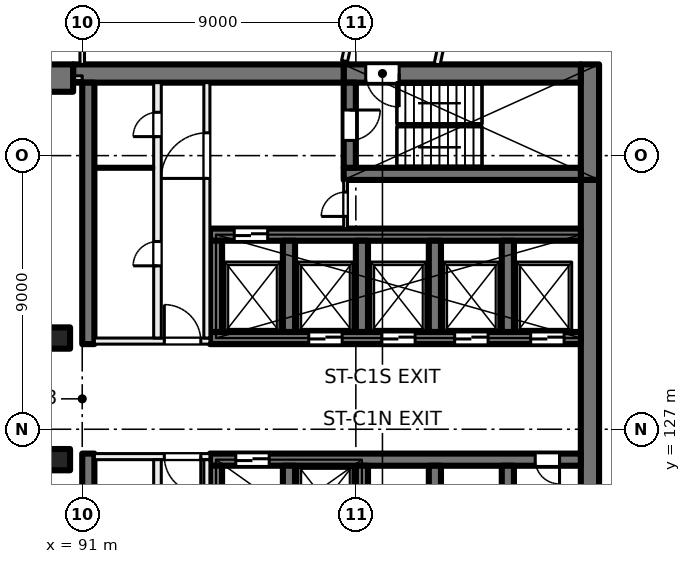
"""IFC4 building model, lengths in metres.
Left out: names, types, materials, properties, quantities, classifications, styles, units other than length and angle.
Written with IfcOpenShell. Run it as: python <this file> out.ifc"""

import sys

from ifc_helpers import new_model, si_unit, direction, frame, frame_2d, origin, origin_2d, place, context, subcontext, project, spatial, rectangle, extrude, element, fill, save


model = new_model("IFC4")
c1 = context("Model", 3, precision=1e-05, world=origin(), true_north=direction((0.0, 1.0)))
c2 = subcontext(c1, "Body", "Model", "MODEL_VIEW")
j1 = project(units=[si_unit("LENGTHUNIT", "METRE"), si_unit("PLANEANGLEUNIT", "RADIAN")], contexts=[c1])
p1 = place(None, origin())
s1 = spatial("IfcSite", under=j1, at=p1, CompositionType="ELEMENT")
p2 = place(p1, origin())
s2 = spatial("IfcBuilding", under=s1, at=p2, CompositionType="ELEMENT")
p3 = place(p2, origin())
s3 = spatial("IfcBuildingStorey", under=s2, at=p3, CompositionType="ELEMENT", Elevation=0.0)
for number, where, z_axis, x_axis in (
    (1, (90.25, 130.0, 0.0), (0.0, 0.0, 1.0), (1.0, 0.0, 0.0)),
    (2, (90.25, 126.0, 0.0), (0.0, 0.0, 1.0), (1.0, 0.0, 0.0)),
):
    element("IfcColumn", number, at=place(p3, frame(where, z_axis=z_axis, x_axis=x_axis)), inside=s3, PredefinedType="COLUMN", context=c2, shape_type="SweptSolid", body=[
        extrude(rectangle(XDim=0.7, YDim=0.7, at=origin_2d()), origin(), (0.0, 0.0, 1.0), 7.5),
    ])
p4 = place(p3, frame((90.25, 138.55, 0.0), z_axis=(0.0, 0.0, 1.0), x_axis=(1.0, 0.0, 0.0)))
e3 = element("IfcColumn", 3, at=p4, inside=s3, PredefinedType="COLUMN", context=c2, shape_type="SweptSolid", body=[
    extrude(rectangle(XDim=0.9, YDim=0.9, at=origin_2d()), origin(), (0.0, 0.0, 1.0), 7.5),
])
p5 = place(p3, frame((107.7, 139.0, 0.0), z_axis=(0.0, 0.0, 1.0), x_axis=(0.0, -1.0, 0.0)))
e4 = element("IfcWall", 4, at=p5, inside=s3, PredefinedType="SHEAR", context=c2, shape_type="SweptSolid", body=[
    extrude(rectangle(XDim=3.8, YDim=0.6, at=frame_2d((1.9, 0.0))), origin(), (0.0, 0.0, 1.0), 7.5),
])
p6 = place(p3, frame((107.7, 135.2, 0.0), z_axis=(0.0, 0.0, 1.0), x_axis=(0.0, -1.0, 0.0)))
e5 = element("IfcWall", 5, at=p6, inside=s3, PredefinedType="SHEAR", context=c2, shape_type="SweptSolid", body=[
    extrude(rectangle(XDim=14.4, YDim=0.6, at=frame_2d((7.2, 0.0))), origin(), (0.0, 0.0, 1.0), 7.5),
])
p7 = place(p3, frame((107.4, 138.7, 0.0), z_axis=(0.0, 0.0, 1.0), x_axis=(-1.0, 0.0, 0.0)))
e6 = element("IfcWall", 6, at=p7, inside=s3, PredefinedType="SHEAR", context=c2, shape_type="SweptSolid", body=[
    extrude(rectangle(XDim=7.8, YDim=0.6, at=frame_2d((3.9, 0.0))), origin(), (0.0, 0.0, 1.0), 7.5),
])
p8 = place(p7, frame((5.975, 0.0, 0.0)))
e7 = element("IfcOpeningElement", 7, at=p8, cuts=e6, PredefinedType="OPENING", context=c2, shape_type="SweptSolid", body=[
    extrude(rectangle(XDim=1.1, YDim=2.1, at=frame_2d((0.55, 1.05))), frame((0.0, 0.31, 0.0), z_axis=(0.0, -1.0, 0.0), x_axis=(1.0, 0.0, 0.0)), (0.0, 0.0, 1.0), 0.62),
])
p9 = place(p3, frame((99.6, 138.7, 0.0), z_axis=(0.0, 0.0, 1.0), x_axis=(-1.0, 0.0, 0.0)))
e8 = element("IfcWall", 8, at=p9, inside=s3, PredefinedType="SHEAR", context=c2, shape_type="SweptSolid", body=[
    extrude(rectangle(XDim=8.9, YDim=0.6, at=frame_2d((4.45, 0.0))), origin(), (0.0, 0.0, 1.0), 7.5),
])
p10 = place(p3, frame((107.4, 135.4, 0.0), z_axis=(0.0, 0.0, 1.0), x_axis=(-1.0, 0.0, 0.0)))
e9 = element("IfcWall", 9, at=p10, inside=s3, PredefinedType="SHEAR", context=c2, shape_type="SweptSolid", body=[
    extrude(rectangle(XDim=7.8, YDim=0.4, at=frame_2d((3.9, 0.0))), origin(), (0.0, 0.0, 1.0), 7.5),
])
p11 = place(p3, frame((99.8, 138.4, 0.0), z_axis=(0.0, 0.0, 1.0), x_axis=(0.0, -1.0, 0.0)))
e10 = element("IfcWall", 10, at=p11, inside=s3, PredefinedType="SHEAR", context=c2, shape_type="SweptSolid", body=[
    extrude(rectangle(XDim=2.8, YDim=0.4, at=frame_2d((1.4, 0.0))), origin(), (0.0, 0.0, 1.0), 7.5),
])
p12 = place(p11, frame((0.9, 0.0, 0.0)))
e11 = element("IfcOpeningElement", 11, at=p12, cuts=e10, PredefinedType="OPENING", context=c2, shape_type="SweptSolid", body=[
    extrude(rectangle(XDim=1.0, YDim=2.1, at=frame_2d((0.5, 1.05))), frame((0.0, 0.21, 0.0), z_axis=(0.0, -1.0, 0.0), x_axis=(1.0, 0.0, 0.0)), (0.0, 0.0, 1.0), 0.42),
])
p13 = place(p3, frame((107.4, 130.0, 0.0), z_axis=(0.0, 0.0, 1.0), x_axis=(-1.0, 0.0, 0.0)))
e12 = element("IfcWall", 12, at=p13, inside=s3, PredefinedType="SHEAR", context=c2, shape_type="SweptSolid", body=[
    extrude(rectangle(XDim=12.2, YDim=0.4, at=frame_2d((6.1, 0.0))), origin(), (0.0, 0.0, 1.0), 7.5),
])
p14 = place(p13, frame((0.55, 0.0, 0.0)))
e13 = element("IfcOpeningElement", 13, at=p14, cuts=e12, PredefinedType="OPENING", context=c2, shape_type="SweptSolid", body=[
    extrude(rectangle(XDim=1.1, YDim=2.1, at=frame_2d((0.55, 1.05))), frame((0.0, 0.21, 0.0), z_axis=(0.0, -1.0, 0.0), x_axis=(1.0, 0.0, 0.0)), (0.0, 0.0, 1.0), 0.42),
])
p15 = place(p13, frame((3.05, 0.0, 0.0)))
e14 = element("IfcOpeningElement", 14, at=p15, cuts=e12, PredefinedType="OPENING", context=c2, shape_type="SweptSolid", body=[
    extrude(rectangle(XDim=1.1, YDim=2.1, at=frame_2d((0.55, 1.05))), frame((0.0, 0.21, 0.0), z_axis=(0.0, -1.0, 0.0), x_axis=(1.0, 0.0, 0.0)), (0.0, 0.0, 1.0), 0.42),
])
p16 = place(p13, frame((5.45, 0.0, 0.0)))
e15 = element("IfcOpeningElement", 15, at=p16, cuts=e12, PredefinedType="OPENING", context=c2, shape_type="SweptSolid", body=[
    extrude(rectangle(XDim=1.1, YDim=2.1, at=frame_2d((0.55, 1.05))), frame((0.0, 0.21, 0.0), z_axis=(0.0, -1.0, 0.0), x_axis=(1.0, 0.0, 0.0)), (0.0, 0.0, 1.0), 0.42),
])
p17 = place(p13, frame((7.85, 0.0, 0.0)))
e16 = element("IfcOpeningElement", 16, at=p17, cuts=e12, PredefinedType="OPENING", context=c2, shape_type="SweptSolid", body=[
    extrude(rectangle(XDim=1.1, YDim=2.1, at=frame_2d((0.55, 1.05))), frame((0.0, 0.21, 0.0), z_axis=(0.0, -1.0, 0.0), x_axis=(1.0, 0.0, 0.0)), (0.0, 0.0, 1.0), 0.42),
])
p18 = place(p3, frame((107.4, 133.4, 0.0), z_axis=(0.0, 0.0, 1.0), x_axis=(-1.0, 0.0, 0.0)))
e17 = element("IfcWall", 17, at=p18, inside=s3, PredefinedType="SHEAR", context=c2, shape_type="SweptSolid", body=[
    extrude(rectangle(XDim=12.2, YDim=0.4, at=frame_2d((6.1, 0.0))), origin(), (0.0, 0.0, 1.0), 7.5),
])
p19 = place(p18, frame((10.3, 0.0, 0.0)))
e18 = element("IfcOpeningElement", 18, at=p19, cuts=e17, PredefinedType="OPENING", context=c2, shape_type="SweptSolid", body=[
    extrude(rectangle(XDim=1.1, YDim=2.1, at=frame_2d((0.55, 1.05))), frame((0.0, 0.21, 0.0), z_axis=(0.0, -1.0, 0.0), x_axis=(1.0, 0.0, 0.0)), (0.0, 0.0, 1.0), 0.42),
])
for number, where, z_axis, x_axis in (
    (19, (105.0, 133.2, 0.0), (0.0, 0.0, 1.0), (0.0, -1.0, 0.0)),
    (20, (102.6, 133.2, 0.0), (0.0, 0.0, 1.0), (0.0, -1.0, 0.0)),
    (21, (100.2, 133.2, 0.0), (0.0, 0.0, 1.0), (0.0, -1.0, 0.0)),
    (22, (97.8, 133.2, 0.0), (0.0, 0.0, 1.0), (0.0, -1.0, 0.0)),
    (23, (95.4, 133.2, 0.0), (0.0, 0.0, 1.0), (0.0, -1.0, 0.0)),
):
    element("IfcWall", number, at=place(p3, frame(where, z_axis=z_axis, x_axis=x_axis)), inside=s3, PredefinedType="SHEAR", context=c2, shape_type="SweptSolid", body=[
        extrude(rectangle(XDim=3.0, YDim=0.4, at=frame_2d((1.5, 0.0))), origin(), (0.0, 0.0, 1.0), 7.5),
    ])
p20 = place(p3, frame((107.4, 126.0, 0.0), z_axis=(0.0, 0.0, 1.0), x_axis=(-1.0, 0.0, 0.0)))
e24 = element("IfcWall", 24, at=p20, inside=s3, PredefinedType="SHEAR", context=c2, shape_type="SweptSolid", body=[
    extrude(rectangle(XDim=12.2, YDim=0.4, at=frame_2d((6.1, 0.0))), origin(), (0.0, 0.0, 1.0), 7.5),
])
p21 = place(p20, frame((10.25, 0.0, 0.0)))
e25 = element("IfcOpeningElement", 25, at=p21, cuts=e24, PredefinedType="OPENING", context=c2, shape_type="SweptSolid", body=[
    extrude(rectangle(XDim=1.1, YDim=2.1, at=frame_2d((0.55, 1.05))), frame((0.0, 0.21, 0.0), z_axis=(0.0, -1.0, 0.0), x_axis=(1.0, 0.0, 0.0)), (0.0, 0.0, 1.0), 0.42),
])
p22 = place(p20, frame((0.7, 0.0, 0.0)))
e26 = element("IfcOpeningElement", 26, at=p22, cuts=e24, PredefinedType="OPENING", context=c2, shape_type="SweptSolid", body=[
    extrude(rectangle(XDim=0.8, YDim=2.1, at=frame_2d((0.4, 1.05))), frame((0.0, 0.21, 0.0), z_axis=(0.0, -1.0, 0.0), x_axis=(1.0, 0.0, 0.0)), (0.0, 0.0, 1.0), 0.42),
])
for number, where, z_axis, x_axis in (
    (27, (105.0, 125.8, 0.0), (0.0, 0.0, 1.0), (0.0, -1.0, 0.0)),
    (28, (102.6, 125.8, 0.0), (0.0, 0.0, 1.0), (0.0, -1.0, 0.0)),
    (29, (100.2, 125.8, 0.0), (0.0, 0.0, 1.0), (0.0, -1.0, 0.0)),
    (30, (97.8, 125.8, 0.0), (0.0, 0.0, 1.0), (0.0, -1.0, 0.0)),
    (31, (95.4, 125.8, 0.0), (0.0, 0.0, 1.0), (0.0, -1.0, 0.0)),
):
    element("IfcWall", number, at=place(p3, frame(where, z_axis=z_axis, x_axis=x_axis)), inside=s3, PredefinedType="SHEAR", context=c2, shape_type="SweptSolid", body=[
        extrude(rectangle(XDim=3.0, YDim=0.4, at=frame_2d((1.5, 0.0))), origin(), (0.0, 0.0, 1.0), 7.5),
    ])
for number, where, z_axis, x_axis in (
    (32, (91.2, 138.4, 0.0), (0.0, 0.0, 1.0), (0.0, -1.0, 0.0)),
    (33, (91.2, 126.2, 0.0), (0.0, 0.0, 1.0), (0.0, -1.0, 0.0)),
):
    element("IfcWall", number, at=place(p3, frame(where, z_axis=z_axis, x_axis=x_axis)), inside=s3, PredefinedType="SHEAR", context=c2, shape_type="SweptSolid", body=[
        extrude(rectangle(XDim=8.6, YDim=0.4, at=frame_2d((4.3, 0.0))), origin(), (0.0, 0.0, 1.0), 7.5),
    ])
p23 = place(p3, frame((95.2, 126.1, 0.0), z_axis=(0.0, 0.0, 1.0), x_axis=(-1.0, 0.0, 0.0)))
e34 = element("IfcWall", 34, at=p23, inside=s3, PredefinedType="PARTITIONING", context=c2, shape_type="SweptSolid", body=[
    extrude(rectangle(XDim=3.8, YDim=0.2, at=frame_2d((1.9, 0.0))), origin(), (0.0, 0.0, 1.0), 7.1),
])
p24 = place(p23, frame((0.3, 0.0, 0.0)))
e35 = element("IfcOpeningElement", 35, at=p24, cuts=e34, PredefinedType="OPENING", context=c2, shape_type="SweptSolid", body=[
    extrude(rectangle(XDim=1.2, YDim=2.1, at=frame_2d((0.6, 1.05))), frame((0.0, 0.11, 0.0), z_axis=(0.0, -1.0, 0.0), x_axis=(1.0, 0.0, 0.0)), (0.0, 0.0, 1.0), 0.22),
])
p25 = place(p3, frame((95.1, 117.6, 0.0), z_axis=(0.0, 0.0, 1.0), x_axis=(0.0, 1.0, 0.0)))
e36 = element("IfcWall", 36, at=p25, inside=s3, PredefinedType="PARTITIONING", context=c2, shape_type="SweptSolid", body=[
    extrude(rectangle(XDim=8.4, YDim=0.2, at=frame_2d((4.2, 0.0))), origin(), (0.0, 0.0, 1.0), 7.1),
])
p26 = place(p25, frame((1.65, 0.0, 0.0)))
e37 = element("IfcOpeningElement", 37, at=p26, cuts=e36, PredefinedType="OPENING", context=c2, shape_type="SweptSolid", body=[
    extrude(rectangle(XDim=1.5, YDim=2.1, at=frame_2d((0.75, 1.05))), frame((0.0, 0.11, 0.0), z_axis=(0.0, -1.0, 0.0), x_axis=(1.0, 0.0, 0.0)), (0.0, 0.0, 1.0), 0.22),
])
p27 = place(p3, frame((93.475, 117.6, 0.0), z_axis=(0.0, 0.0, 1.0), x_axis=(0.0, 1.0, 0.0)))
e38 = element("IfcWall", 38, at=p27, inside=s3, PredefinedType="PARTITIONING", context=c2, shape_type="SweptSolid", body=[
    extrude(rectangle(XDim=8.4, YDim=0.25, at=frame_2d((4.2, 0.0))), origin(), (0.0, 0.0, 1.0), 7.1),
])
p28 = place(p27, frame((3.8, 0.0, 0.0)))
e39 = element("IfcOpeningElement", 39, at=p28, cuts=e38, PredefinedType="OPENING", context=c2, shape_type="SweptSolid", body=[
    extrude(rectangle(XDim=0.8, YDim=2.1, at=frame_2d((0.4, 1.05))), frame((0.0, 0.135, 0.0), z_axis=(0.0, -1.0, 0.0), x_axis=(1.0, 0.0, 0.0)), (0.0, 0.0, 1.0), 0.27),
])
p29 = place(p3, frame((91.4, 129.9, 0.0), z_axis=(0.0, 0.0, 1.0), x_axis=(1.0, 0.0, 0.0)))
e40 = element("IfcWall", 40, at=p29, inside=s3, PredefinedType="PARTITIONING", context=c2, shape_type="SweptSolid", body=[
    extrude(rectangle(XDim=3.8, YDim=0.2, at=frame_2d((1.9, 0.0))), origin(), (0.0, 0.0, 1.0), 7.1),
])
p30 = place(p29, frame((2.3, 0.0, 0.0)))
e41 = element("IfcOpeningElement", 41, at=p30, cuts=e40, PredefinedType="OPENING", context=c2, shape_type="SweptSolid", body=[
    extrude(rectangle(XDim=1.2, YDim=2.1, at=frame_2d((0.6, 1.05))), frame((0.0, 0.11, 0.0), z_axis=(0.0, -1.0, 0.0), x_axis=(1.0, 0.0, 0.0)), (0.0, 0.0, 1.0), 0.22),
])
p31 = place(p3, frame((95.1, 130.0, 0.0), z_axis=(0.0, 0.0, 1.0), x_axis=(0.0, 1.0, 0.0)))
e42 = element("IfcWall", 42, at=p31, inside=s3, PredefinedType="PARTITIONING", context=c2, shape_type="SweptSolid", body=[
    extrude(rectangle(XDim=8.4, YDim=0.2, at=frame_2d((4.2, 0.0))), origin(), (0.0, 0.0, 1.0), 7.1),
])
p32 = place(p31, frame((5.25, 0.0, 0.0)))
e43 = element("IfcOpeningElement", 43, at=p32, cuts=e42, PredefinedType="OPENING", context=c2, shape_type="SweptSolid", body=[
    extrude(rectangle(XDim=1.5, YDim=2.1, at=frame_2d((0.75, 1.05))), frame((0.0, 0.11, 0.0), z_axis=(0.0, -1.0, 0.0), x_axis=(1.0, 0.0, 0.0)), (0.0, 0.0, 1.0), 0.22),
])
p33 = place(p3, frame((93.475, 130.0, 0.0), z_axis=(0.0, 0.0, 1.0), x_axis=(0.0, 1.0, 0.0)))
e44 = element("IfcWall", 44, at=p33, inside=s3, PredefinedType="PARTITIONING", context=c2, shape_type="SweptSolid", body=[
    extrude(rectangle(XDim=8.4, YDim=0.25, at=frame_2d((4.2, 0.0))), origin(), (0.0, 0.0, 1.0), 7.1),
])
p34 = place(p33, frame((2.375, 0.0, 0.0)))
e45 = element("IfcOpeningElement", 45, at=p34, cuts=e44, PredefinedType="OPENING", context=c2, shape_type="SweptSolid", body=[
    extrude(rectangle(XDim=0.8, YDim=2.1, at=frame_2d((0.4, 1.05))), frame((0.0, 0.135, 0.0), z_axis=(0.0, -1.0, 0.0), x_axis=(1.0, 0.0, 0.0)), (0.0, 0.0, 1.0), 0.27),
])
p35 = place(p33, frame((6.625, 0.0, 0.0)))
e46 = element("IfcOpeningElement", 46, at=p35, cuts=e44, PredefinedType="OPENING", context=c2, shape_type="SweptSolid", body=[
    extrude(rectangle(XDim=0.8, YDim=2.1, at=frame_2d((0.4, 1.05))), frame((0.0, 0.135, 0.0), z_axis=(0.0, -1.0, 0.0), x_axis=(1.0, 0.0, 0.0)), (0.0, 0.0, 1.0), 0.27),
])
p36 = place(p3, frame((99.663, 133.6, 0.0), z_axis=(0.0, 0.0, 1.0), x_axis=(0.0, 1.0, 0.0)))
e47 = element("IfcWall", 47, at=p36, inside=s3, PredefinedType="PARTITIONING", context=c2, shape_type="SweptSolid", body=[
    extrude(rectangle(XDim=1.6, YDim=0.125, at=frame_2d((0.8, 0.0))), origin(), (0.0, 0.0, 1.0), 7.1),
])
p37 = place(p36, frame((0.4, 0.0, 0.0)))
e48 = element("IfcOpeningElement", 48, at=p37, cuts=e47, PredefinedType="OPENING", context=c2, shape_type="SweptSolid", body=[
    extrude(rectangle(XDim=0.8, YDim=2.1, at=frame_2d((0.4, 1.05))), frame((0.0, 0.073, 0.0), z_axis=(0.0, -1.0, 0.0), x_axis=(1.0, 0.0, 0.0)), (0.0, 0.0, 1.0), 0.145),
])
p38 = place(p3, frame((91.4, 135.6, 0.0), z_axis=(0.0, 0.0, 1.0), x_axis=(1.0, 0.0, 0.0)))
e49 = element("IfcWall", 49, at=p38, inside=s3, PredefinedType="PARTITIONING", context=c2, shape_type="SweptSolid", body=[
    extrude(rectangle(XDim=1.95, YDim=0.1, at=frame_2d((0.975, 0.0))), origin(), (0.0, 0.0, 1.0), 7.1),
])
p39 = place(p3, frame((72.22, 138.55, 0.0), z_axis=(0.0, 0.0, 1.0), x_axis=(1.0, 0.0, 0.0)))
e50 = element("IfcWall", 50, at=p39, inside=s3, PredefinedType="PARTITIONING", context=c2, shape_type="SweptSolid", body=[
    extrude(rectangle(XDim=18.78, YDim=0.15, at=frame_2d((9.39, 0.0))), origin(), (0.0, 0.0, 1.0), 7.1),
])
p40 = place(p39, frame((1.717, 0.0, 0.0)))
e51 = element("IfcOpeningElement", 51, at=p40, cuts=e50, PredefinedType="OPENING", context=c2, shape_type="SweptSolid", body=[
    extrude(rectangle(XDim=1.0, YDim=2.1, at=frame_2d((0.5, 1.05))), frame((0.0, 0.085, 0.0), z_axis=(0.0, -1.0, 0.0), x_axis=(1.0, 0.0, 0.0)), (0.0, 0.0, 1.0), 0.17),
])
p41 = place(p39, frame((11.153, 0.0, 0.0)))
e52 = element("IfcOpeningElement", 52, at=p41, cuts=e50, PredefinedType="OPENING", context=c2, shape_type="SweptSolid", body=[
    extrude(rectangle(XDim=1.0, YDim=2.1, at=frame_2d((0.5, 1.05))), frame((0.0, 0.085, 0.0), z_axis=(0.0, -1.0, 0.0), x_axis=(1.0, 0.0, 0.0)), (0.0, 0.0, 1.0), 0.17),
])
p42 = place(p3, frame((91.0, 139.0, 0.0), z_axis=(0.0, 0.0, 1.0), x_axis=(0.0, 1.0, 0.0)))
e53 = element("IfcWall", 53, at=p42, inside=s3, PredefinedType="PARTITIONING", context=c2, shape_type="SweptSolid", body=[
    extrude(rectangle(XDim=7.4, YDim=0.15, at=frame_2d((3.7, 0.0))), origin(), (0.0, 0.0, 1.0), 7.1),
])
p43 = place(p3, frame((99.629, 139.11, 0.0), z_axis=(0.0, 0.0, 1.0), x_axis=(0.207857580424, 0.978159100689, 0.0)))
e54 = element("IfcWall", 54, at=p43, inside=s3, PredefinedType="PARTITIONING", context=c2, shape_type="SweptSolid", body=[
    extrude(rectangle(XDim=7.453, YDim=0.2, at=frame_2d((3.726, 0.0))), origin(), (0.0, 0.0, 1.0), 7.1),
])
p44 = place(p43, frame((3.176, 0.0, 0.0)))
e55 = element("IfcOpeningElement", 55, at=p44, cuts=e54, PredefinedType="OPENING", context=c2, shape_type="SweptSolid", body=[
    extrude(rectangle(XDim=1.0, YDim=2.1, at=frame_2d((0.5, 1.05))), frame((0.0, 0.11, 0.0), z_axis=(0.0, -1.0, 0.0), x_axis=(1.0, 0.0, 0.0)), (0.0, 0.0, 1.0), 0.22),
])
p45 = place(p3, frame((102.672, 139.0, 0.0), z_axis=(0.0, 0.0, 1.0), x_axis=(0.207950149313, 0.978139425338, 0.0)))
e56 = element("IfcWall", 56, at=p45, inside=s3, PredefinedType="PARTITIONING", context=c2, shape_type="SweptSolid", body=[
    extrude(rectangle(XDim=5.112, YDim=0.2, at=frame_2d((2.556, 0.0))), origin(), (0.0, 0.0, 1.0), 7.1),
])
p46 = place(p21, origin())
e57 = element("IfcDoor", 57, at=p46, inside=s3, OperationType="DOUBLE_DOOR_SLIDING", PredefinedType="DOOR", context=c2, shape_type="SweptSolid", body=[
    extrude(rectangle(XDim=1.1, YDim=2.1, at=frame_2d((0.55, 1.05))), frame((0.0, 0.025, 0.0), z_axis=(0.0, -1.0, 0.0), x_axis=(1.0, 0.0, 0.0)), (0.0, 0.0, 1.0), 0.05),
])
fill(e25, e57)
p47 = place(p14, origin())
e58 = element("IfcDoor", 58, at=p47, inside=s3, OperationType="DOUBLE_DOOR_SLIDING", PredefinedType="DOOR", context=c2, shape_type="SweptSolid", body=[
    extrude(rectangle(XDim=1.1, YDim=2.1, at=frame_2d((0.55, 1.05))), frame((0.0, 0.025, 0.0), z_axis=(0.0, -1.0, 0.0), x_axis=(1.0, 0.0, 0.0)), (0.0, 0.0, 1.0), 0.05),
])
fill(e13, e58)
p48 = place(p15, origin())
e59 = element("IfcDoor", 59, at=p48, inside=s3, OperationType="DOUBLE_DOOR_SLIDING", PredefinedType="DOOR", context=c2, shape_type="SweptSolid", body=[
    extrude(rectangle(XDim=1.1, YDim=2.1, at=frame_2d((0.55, 1.05))), frame((0.0, 0.025, 0.0), z_axis=(0.0, -1.0, 0.0), x_axis=(1.0, 0.0, 0.0)), (0.0, 0.0, 1.0), 0.05),
])
fill(e14, e59)
p49 = place(p16, origin())
e60 = element("IfcDoor", 60, at=p49, inside=s3, OperationType="DOUBLE_DOOR_SLIDING", PredefinedType="DOOR", context=c2, shape_type="SweptSolid", body=[
    extrude(rectangle(XDim=1.1, YDim=2.1, at=frame_2d((0.55, 1.05))), frame((0.0, 0.025, 0.0), z_axis=(0.0, -1.0, 0.0), x_axis=(1.0, 0.0, 0.0)), (0.0, 0.0, 1.0), 0.05),
])
fill(e15, e60)
p50 = place(p17, origin())
e61 = element("IfcDoor", 61, at=p50, inside=s3, OperationType="DOUBLE_DOOR_SLIDING", PredefinedType="DOOR", context=c2, shape_type="SweptSolid", body=[
    extrude(rectangle(XDim=1.1, YDim=2.1, at=frame_2d((0.55, 1.05))), frame((0.0, 0.025, 0.0), z_axis=(0.0, -1.0, 0.0), x_axis=(1.0, 0.0, 0.0)), (0.0, 0.0, 1.0), 0.05),
])
fill(e16, e61)
p51 = place(p22, origin())
e62 = element("IfcDoor", 62, at=p51, inside=s3, OperationType="SINGLE_SWING_LEFT", PredefinedType="DOOR", context=c2, shape_type="SweptSolid", body=[
    extrude(rectangle(XDim=0.8, YDim=2.1, at=frame_2d((0.4, 1.05))), frame((0.0, 0.025, 0.0), z_axis=(0.0, -1.0, 0.0), x_axis=(1.0, 0.0, 0.0)), (0.0, 0.0, 1.0), 0.05),
])
fill(e26, e62)
p52 = place(p24, origin())
e63 = element("IfcDoor", 63, at=p52, inside=s3, OperationType="DOUBLE_DOOR_SINGLE_SWING", PredefinedType="DOOR", context=c2, shape_type="SweptSolid", body=[
    extrude(rectangle(XDim=1.2, YDim=2.1, at=frame_2d((0.6, 1.05))), frame((0.0, 0.025, 0.0), z_axis=(0.0, -1.0, 0.0), x_axis=(1.0, 0.0, 0.0)), (0.0, 0.0, 1.0), 0.05),
])
fill(e35, e63)
p53 = place(p30, origin())
e64 = element("IfcDoor", 64, at=p53, inside=s3, OperationType="DOUBLE_DOOR_SINGLE_SWING", PredefinedType="DOOR", context=c2, shape_type="SweptSolid", body=[
    extrude(rectangle(XDim=1.2, YDim=2.1, at=frame_2d((0.6, 1.05))), frame((0.0, 0.025, 0.0), z_axis=(0.0, -1.0, 0.0), x_axis=(1.0, 0.0, 0.0)), (0.0, 0.0, 1.0), 0.05),
])
fill(e41, e64)
p54 = place(p32, origin())
e65 = element("IfcDoor", 65, at=p54, inside=s3, OperationType="DOUBLE_DOOR_SINGLE_SWING", PredefinedType="DOOR", context=c2, shape_type="SweptSolid", body=[
    extrude(rectangle(XDim=1.5, YDim=2.1, at=frame_2d((0.75, 1.05))), frame((0.0, 0.025, 0.0), z_axis=(0.0, -1.0, 0.0), x_axis=(1.0, 0.0, 0.0)), (0.0, 0.0, 1.0), 0.05),
])
fill(e43, e65)
p55 = place(p12, origin())
e66 = element("IfcDoor", 66, at=p55, inside=s3, OperationType="SINGLE_SWING_RIGHT", PredefinedType="DOOR", context=c2, shape_type="SweptSolid", body=[
    extrude(rectangle(XDim=1.0, YDim=2.1, at=frame_2d((0.5, 1.05))), frame((0.0, 0.025, 0.0), z_axis=(0.0, -1.0, 0.0), x_axis=(1.0, 0.0, 0.0)), (0.0, 0.0, 1.0), 0.05),
])
fill(e11, e66)
p56 = place(p37, origin())
e67 = element("IfcDoor", 67, at=p56, inside=s3, OperationType="SINGLE_SWING_LEFT", PredefinedType="DOOR", context=c2, shape_type="SweptSolid", body=[
    extrude(rectangle(XDim=0.8, YDim=2.1, at=frame_2d((0.4, 1.05))), frame((0.0, 0.025, 0.0), z_axis=(0.0, -1.0, 0.0), x_axis=(1.0, 0.0, 0.0)), (0.0, 0.0, 1.0), 0.05),
])
fill(e48, e67)
p57 = place(p34, origin())
e68 = element("IfcDoor", 68, at=p57, inside=s3, OperationType="SINGLE_SWING_RIGHT", PredefinedType="DOOR", context=c2, shape_type="SweptSolid", body=[
    extrude(rectangle(XDim=0.8, YDim=2.1, at=frame_2d((0.4, 1.05))), frame((0.0, 0.025, 0.0), z_axis=(0.0, -1.0, 0.0), x_axis=(1.0, 0.0, 0.0)), (0.0, 0.0, 1.0), 0.05),
])
fill(e45, e68)
p58 = place(p35, origin())
e69 = element("IfcDoor", 69, at=p58, inside=s3, OperationType="SINGLE_SWING_LEFT", PredefinedType="DOOR", context=c2, shape_type="SweptSolid", body=[
    extrude(rectangle(XDim=0.8, YDim=2.1, at=frame_2d((0.4, 1.05))), frame((0.0, 0.025, 0.0), z_axis=(0.0, -1.0, 0.0), x_axis=(1.0, 0.0, 0.0)), (0.0, 0.0, 1.0), 0.05),
])
fill(e46, e69)
p59 = place(p19, origin())
e70 = element("IfcDoor", 70, at=p59, inside=s3, OperationType="DOUBLE_DOOR_SLIDING", PredefinedType="DOOR", context=c2, shape_type="SweptSolid", body=[
    extrude(rectangle(XDim=1.1, YDim=2.1, at=frame_2d((0.55, 1.05))), frame((0.0, 0.025, 0.0), z_axis=(0.0, -1.0, 0.0), x_axis=(1.0, 0.0, 0.0)), (0.0, 0.0, 1.0), 0.05),
])
fill(e18, e70)
p60 = place(p8, origin())
e71 = element("IfcDoor", 71, at=p60, inside=s3, OperationType="SINGLE_SWING_LEFT", PredefinedType="DOOR", context=c2, shape_type="SweptSolid", body=[
    extrude(rectangle(XDim=1.1, YDim=2.1, at=frame_2d((0.55, 1.05))), frame((0.0, 0.025, 0.0), z_axis=(0.0, -1.0, 0.0), x_axis=(1.0, 0.0, 0.0)), (0.0, 0.0, 1.0), 0.05),
])
fill(e7, e71)
save(model, sys.argv[1])
